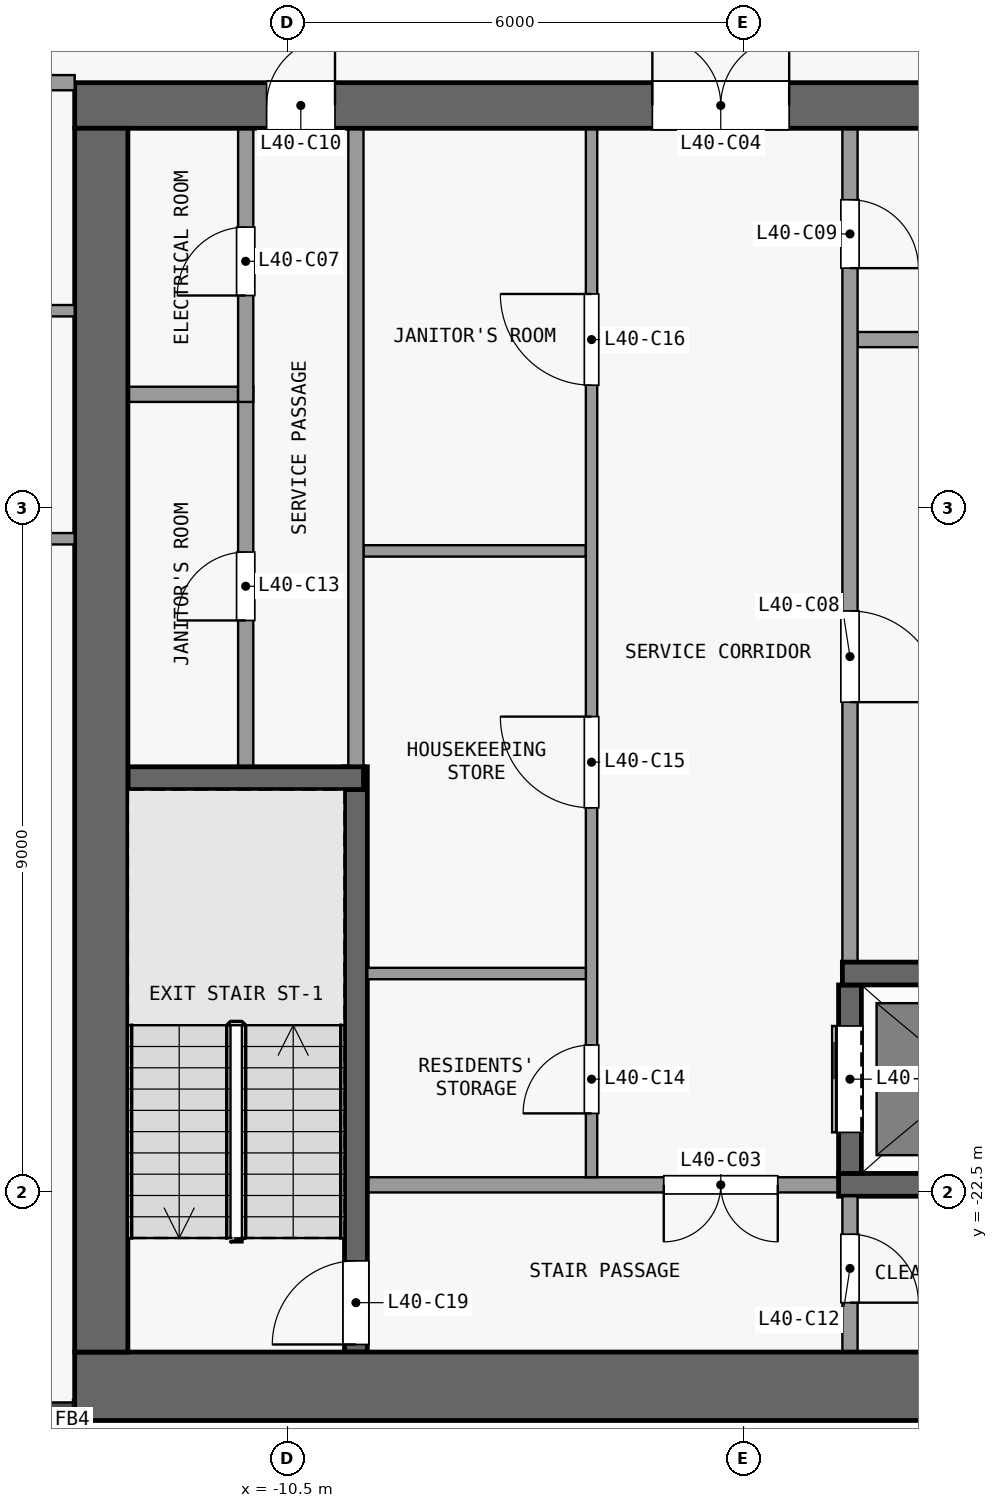
"""IFC4 building model, lengths in metres.
Left out: names, types, materials, properties, quantities, classifications, styles, units other than length and angle.
Written with IfcOpenShell. Run it as: python <this file> out.ifc"""

import sys

from ifc_helpers import new_model, si_unit, direction, frame, frame_2d, origin, place, context, subcontext, project, spatial, rectangle, extrude, element, fill, save


model = new_model("IFC4")
c1 = context("Model", 3, precision=1e-05, world=origin(), true_north=direction((0.0, 1.0)))
c2 = subcontext(c1, "Body", "Model", "MODEL_VIEW")
j1 = project(units=[si_unit("LENGTHUNIT", "METRE"), si_unit("PLANEANGLEUNIT", "RADIAN")], contexts=[c1])
p1 = place(None, origin())
s1 = spatial("IfcSite", under=j1, at=p1, CompositionType="ELEMENT")
p2 = place(p1, origin())
s2 = spatial("IfcBuilding", under=s1, at=p2, CompositionType="ELEMENT")
p3 = place(p2, frame((0.0, 0.0, 163.7)))
s3 = spatial("IfcBuildingStorey", under=s2, at=p3, CompositionType="ELEMENT", Elevation=163.7)
p4 = place(p3, frame((-13.3, -25.05, 0.0), z_axis=(0.0, 0.0, 1.0), x_axis=(1.0, 0.0, 0.0)))
e1 = element("IfcWall", 1, at=p4, inside=s3, PredefinedType="SHEAR", context=c2, shape_type="SweptSolid", body=[
    extrude(rectangle(XDim=26.6, YDim=0.9, at=frame_2d((13.3, 0.0))), origin(), (0.0, 0.0, 1.0), 3.3),
])
p5 = place(p3, frame((-13.3, -8.2, 0.0), z_axis=(0.0, 0.0, 1.0), x_axis=(1.0, 0.0, 0.0)))
e2 = element("IfcWall", 2, at=p5, inside=s3, PredefinedType="SHEAR", context=c2, shape_type="SweptSolid", body=[
    extrude(rectangle(XDim=26.6, YDim=0.6, at=frame_2d((13.3, 0.0))), origin(), (0.0, 0.0, 1.0), 3.3),
])
p6 = place(p5, frame((7.6, 0.0, 0.0)))
e3 = element("IfcOpeningElement", 3, at=p6, cuts=e2, PredefinedType="OPENING", context=c2, shape_type="SweptSolid", body=[
    extrude(rectangle(XDim=1.8, YDim=2.1, at=frame_2d((0.9, 1.05))), frame((0.0, 0.31, 0.0), z_axis=(0.0, -1.0, 0.0), x_axis=(1.0, 0.0, 0.0)), (0.0, 0.0, 1.0), 0.62),
])
p7 = place(p5, frame((17.2, 0.0, 0.0)))
e4 = element("IfcOpeningElement", 4, at=p7, cuts=e2, PredefinedType="OPENING", context=c2, shape_type="SweptSolid", body=[
    extrude(rectangle(XDim=1.8, YDim=2.1, at=frame_2d((0.9, 1.05))), frame((0.0, 0.31, 0.0), z_axis=(0.0, -1.0, 0.0), x_axis=(1.0, 0.0, 0.0)), (0.0, 0.0, 1.0), 0.62),
])
p8 = place(p5, frame((2.525, 0.0, 0.0)))
e5 = element("IfcOpeningElement", 5, at=p8, cuts=e2, PredefinedType="OPENING", context=c2, shape_type="SweptSolid", body=[
    extrude(rectangle(XDim=0.9, YDim=2.1, at=frame_2d((0.45, 1.05))), frame((0.0, 0.31, 0.0), z_axis=(0.0, -1.0, 0.0), x_axis=(1.0, 0.0, 0.0)), (0.0, 0.0, 1.0), 0.62),
])
p9 = place(p5, frame((23.875, 0.0, 0.0)))
e6 = element("IfcOpeningElement", 6, at=p9, cuts=e2, PredefinedType="OPENING", context=c2, shape_type="SweptSolid", body=[
    extrude(rectangle(XDim=1.2, YDim=2.1, at=frame_2d((0.6, 1.05))), frame((0.0, 0.31, 0.0), z_axis=(0.0, -1.0, 0.0), x_axis=(1.0, 0.0, 0.0)), (0.0, 0.0, 1.0), 0.62),
])
p10 = place(p3, frame((-12.95, -24.6, 0.0), z_axis=(0.0, 0.0, 1.0), x_axis=(0.0, 1.0, 0.0)))
e7 = element("IfcWall", 7, at=p10, inside=s3, PredefinedType="SHEAR", context=c2, shape_type="SweptSolid", body=[
    extrude(rectangle(XDim=16.1, YDim=0.7, at=frame_2d((8.05, 0.0))), origin(), (0.0, 0.0, 1.0), 3.3),
])
p11 = place(p3, frame((-3.25, -22.4, 0.0), z_axis=(0.0, 0.0, 1.0), x_axis=(-1.0, 0.0, 0.0)))
e8 = element("IfcWall", 8, at=p11, inside=s3, PredefinedType="PARTITIONING", context=c2, shape_type="SweptSolid", body=[
    extrude(rectangle(XDim=6.2, YDim=0.2, at=frame_2d((3.1, 0.0))), origin(), (0.0, 0.0, 1.0), 3.3),
])
p12 = place(p11, frame((0.8, 0.0, 0.0)))
e9 = element("IfcOpeningElement", 9, at=p12, cuts=e8, PredefinedType="OPENING", context=c2, shape_type="SweptSolid", body=[
    extrude(rectangle(XDim=1.5, YDim=2.1, at=frame_2d((0.75, 1.05))), frame((0.0, 0.11, 0.0), z_axis=(0.0, -1.0, 0.0), x_axis=(1.0, 0.0, 0.0)), (0.0, 0.0, 1.0), 0.22),
])
p13 = place(p3, frame((-3.25, -22.4, 0.0), z_axis=(0.0, 0.0, 1.0), x_axis=(1.0, 0.0, 0.0)))
e10 = element("IfcWall", 10, at=p13, inside=s3, PredefinedType="SHEAR", context=c2, shape_type="SweptSolid", body=[
    extrude(rectangle(XDim=6.2, YDim=0.3, at=frame_2d((3.1, 0.0))), origin(), (0.0, 0.0, 1.0), 3.3),
])
p14 = place(p3, frame((-9.45, -19.62, 0.0), z_axis=(0.0, 0.0, 1.0), x_axis=(1.0, 0.0, 0.0)))
e11 = element("IfcWall", 11, at=p14, inside=s3, PredefinedType="PARTITIONING", context=c2, shape_type="SweptSolid", body=[
    extrude(rectangle(XDim=2.875, YDim=0.15, at=frame_2d((1.438, 0.0))), origin(), (0.0, 0.0, 1.0), 3.3),
])
p15 = place(p3, frame((-3.2, -19.62, 0.0), z_axis=(0.0, 0.0, 1.0), x_axis=(1.0, 0.0, 0.0)))
e12 = element("IfcWall", 12, at=p15, inside=s3, PredefinedType="SHEAR", context=c2, shape_type="SweptSolid", body=[
    extrude(rectangle(XDim=3.05, YDim=0.3, at=frame_2d((1.525, 0.0))), origin(), (0.0, 0.0, 1.0), 3.3),
])
p16 = place(p3, frame((-12.6, -17.05, 0.0), z_axis=(0.0, 0.0, 1.0), x_axis=(1.0, 0.0, 0.0)))
e13 = element("IfcWall", 13, at=p16, inside=s3, PredefinedType="SHEAR", context=c2, shape_type="SweptSolid", body=[
    extrude(rectangle(XDim=3.1, YDim=0.3, at=frame_2d((1.55, 0.0))), origin(), (0.0, 0.0, 1.0), 3.3),
])
p17 = place(p3, frame((-9.5, -14.06, 0.0), z_axis=(0.0, 0.0, 1.0), x_axis=(1.0, 0.0, 0.0)))
e14 = element("IfcWall", 14, at=p17, inside=s3, PredefinedType="PARTITIONING", context=c2, shape_type="SweptSolid", body=[
    extrude(rectangle(XDim=2.925, YDim=0.15, at=frame_2d((1.462, 0.0))), origin(), (0.0, 0.0, 1.0), 3.3),
])
p18 = place(p3, frame((-12.6, -12.0, 0.0), z_axis=(0.0, 0.0, 1.0), x_axis=(1.0, 0.0, 0.0)))
e15 = element("IfcWall", 15, at=p18, inside=s3, PredefinedType="PARTITIONING", context=c2, shape_type="SweptSolid", body=[
    extrude(rectangle(XDim=1.45, YDim=0.2, at=frame_2d((0.725, 0.0))), origin(), (0.0, 0.0, 1.0), 3.3),
])
p19 = place(p3, frame((-3.0, -11.28, 0.0), z_axis=(0.0, 0.0, 1.0), x_axis=(1.0, 0.0, 0.0)))
e16 = element("IfcWall", 16, at=p19, inside=s3, PredefinedType="PARTITIONING", context=c2, shape_type="SweptSolid", body=[
    extrude(rectangle(XDim=2.85, YDim=0.2, at=frame_2d((1.425, 0.0))), origin(), (0.0, 0.0, 1.0), 3.3),
])
p20 = place(p3, frame((-11.05, -16.9, 0.0), z_axis=(0.0, 0.0, 1.0), x_axis=(0.0, 1.0, 0.0)))
e17 = element("IfcWall", 17, at=p20, inside=s3, PredefinedType="PARTITIONING", context=c2, shape_type="SweptSolid", body=[
    extrude(rectangle(XDim=5.0, YDim=0.2, at=frame_2d((2.5, 0.0))), origin(), (0.0, 0.0, 1.0), 3.3),
])
p21 = place(p20, frame((1.925, 0.0, 0.0)))
e18 = element("IfcOpeningElement", 18, at=p21, cuts=e17, PredefinedType="OPENING", context=c2, shape_type="SweptSolid", body=[
    extrude(rectangle(XDim=0.9, YDim=2.1, at=frame_2d((0.45, 1.05))), frame((0.0, 0.11, 0.0), z_axis=(0.0, -1.0, 0.0), x_axis=(1.0, 0.0, 0.0)), (0.0, 0.0, 1.0), 0.22),
])
p22 = place(p3, frame((-11.05, -12.1, 0.0), z_axis=(0.0, 0.0, 1.0), x_axis=(0.0, 1.0, 0.0)))
e19 = element("IfcWall", 19, at=p22, inside=s3, PredefinedType="PARTITIONING", context=c2, shape_type="SweptSolid", body=[
    extrude(rectangle(XDim=3.6, YDim=0.2, at=frame_2d((1.8, 0.0))), origin(), (0.0, 0.0, 1.0), 3.3),
])
p23 = place(p22, frame((1.4, 0.0, 0.0)))
e20 = element("IfcOpeningElement", 20, at=p23, cuts=e19, PredefinedType="OPENING", context=c2, shape_type="SweptSolid", body=[
    extrude(rectangle(XDim=0.9, YDim=2.1, at=frame_2d((0.45, 1.05))), frame((0.0, 0.11, 0.0), z_axis=(0.0, -1.0, 0.0), x_axis=(1.0, 0.0, 0.0)), (0.0, 0.0, 1.0), 0.22),
])
p24 = place(p3, frame((-9.6, -24.6, 0.0), z_axis=(0.0, 0.0, 1.0), x_axis=(0.0, 1.0, 0.0)))
e21 = element("IfcWall", 21, at=p24, inside=s3, PredefinedType="SHEAR", context=c2, shape_type="SweptSolid", body=[
    extrude(rectangle(XDim=7.7, YDim=0.3, at=frame_2d((3.85, 0.0))), origin(), (0.0, 0.0, 1.0), 3.3),
])
p25 = place(p24, frame((0.1, 0.0, 0.0)))
e22 = element("IfcOpeningElement", 22, at=p25, cuts=e21, PredefinedType="OPENING", context=c2, shape_type="SweptSolid", body=[
    extrude(rectangle(XDim=1.1, YDim=2.1, at=frame_2d((0.55, 1.05))), frame((0.0, 0.16, 0.0), z_axis=(0.0, -1.0, 0.0), x_axis=(1.0, 0.0, 0.0)), (0.0, 0.0, 1.0), 0.32),
])
p26 = place(p3, frame((-9.6, -16.9, 0.0), z_axis=(0.0, 0.0, 1.0), x_axis=(0.0, 1.0, 0.0)))
e23 = element("IfcWall", 23, at=p26, inside=s3, PredefinedType="PARTITIONING", context=c2, shape_type="SweptSolid", body=[
    extrude(rectangle(XDim=8.4, YDim=0.2, at=frame_2d((4.2, 0.0))), origin(), (0.0, 0.0, 1.0), 3.3),
])
p27 = place(p3, frame((-6.5, -22.3, 0.0), z_axis=(0.0, 0.0, 1.0), x_axis=(0.0, 1.0, 0.0)))
e24 = element("IfcWall", 24, at=p27, inside=s3, PredefinedType="PARTITIONING", context=c2, shape_type="SweptSolid", body=[
    extrude(rectangle(XDim=13.8, YDim=0.15, at=frame_2d((6.9, 0.0))), origin(), (0.0, 0.0, 1.0), 3.3),
])
p28 = place(p27, frame((0.84, 0.0, 0.0)))
e25 = element("IfcOpeningElement", 25, at=p28, cuts=e24, PredefinedType="OPENING", context=c2, shape_type="SweptSolid", body=[
    extrude(rectangle(XDim=0.9, YDim=2.1, at=frame_2d((0.45, 1.05))), frame((0.0, 0.085, 0.0), z_axis=(0.0, -1.0, 0.0), x_axis=(1.0, 0.0, 0.0)), (0.0, 0.0, 1.0), 0.17),
])
p29 = place(p27, frame((4.86, 0.0, 0.0)))
e26 = element("IfcOpeningElement", 26, at=p29, cuts=e24, PredefinedType="OPENING", context=c2, shape_type="SweptSolid", body=[
    extrude(rectangle(XDim=1.2, YDim=2.1, at=frame_2d((0.6, 1.05))), frame((0.0, 0.085, 0.0), z_axis=(0.0, -1.0, 0.0), x_axis=(1.0, 0.0, 0.0)), (0.0, 0.0, 1.0), 0.17),
])
p30 = place(p27, frame((10.42, 0.0, 0.0)))
e27 = element("IfcOpeningElement", 27, at=p30, cuts=e24, PredefinedType="OPENING", context=c2, shape_type="SweptSolid", body=[
    extrude(rectangle(XDim=1.2, YDim=2.1, at=frame_2d((0.6, 1.05))), frame((0.0, 0.085, 0.0), z_axis=(0.0, -1.0, 0.0), x_axis=(1.0, 0.0, 0.0)), (0.0, 0.0, 1.0), 0.17),
])
p31 = place(p3, frame((-3.1, -22.55, 0.0), z_axis=(0.0, 0.0, 1.0), x_axis=(0.0, -1.0, 0.0)))
e28 = element("IfcWall", 28, at=p31, inside=s3, PredefinedType="PARTITIONING", context=c2, shape_type="SweptSolid", body=[
    extrude(rectangle(XDim=2.05, YDim=0.2, at=frame_2d((1.025, 0.0))), origin(), (0.0, 0.0, 1.0), 3.3),
])
p32 = place(p31, frame((0.5, 0.0, 0.0)))
e29 = element("IfcOpeningElement", 29, at=p32, cuts=e28, PredefinedType="OPENING", context=c2, shape_type="SweptSolid", body=[
    extrude(rectangle(XDim=0.9, YDim=2.1, at=frame_2d((0.45, 1.05))), frame((0.0, 0.11, 0.0), z_axis=(0.0, -1.0, 0.0), x_axis=(1.0, 0.0, 0.0)), (0.0, 0.0, 1.0), 0.22),
])
p33 = place(p3, frame((-3.1, -22.25, 0.0), z_axis=(0.0, 0.0, 1.0), x_axis=(0.0, 1.0, 0.0)))
e30 = element("IfcWall", 30, at=p33, inside=s3, PredefinedType="SHEAR", context=c2, shape_type="SweptSolid", body=[
    extrude(rectangle(XDim=2.48, YDim=0.3, at=frame_2d((1.24, 0.0))), origin(), (0.0, 0.0, 1.0), 3.3),
])
p34 = place(p33, frame((0.54, 0.0, 0.0)))
e31 = element("IfcOpeningElement", 31, at=p34, cuts=e30, PredefinedType="OPENING", context=c2, shape_type="SweptSolid", body=[
    extrude(rectangle(XDim=1.4, YDim=2.1, at=frame_2d((0.7, 1.05))), frame((0.0, 0.16, 0.0), z_axis=(0.0, -1.0, 0.0), x_axis=(1.0, 0.0, 0.0)), (0.0, 0.0, 1.0), 0.32),
])
p35 = place(p3, frame((-3.1, -8.5, 0.0), z_axis=(0.0, 0.0, 1.0), x_axis=(0.0, -1.0, 0.0)))
e32 = element("IfcWall", 32, at=p35, inside=s3, PredefinedType="PARTITIONING", context=c2, shape_type="SweptSolid", body=[
    extrude(rectangle(XDim=10.97, YDim=0.2, at=frame_2d((5.485, 0.0))), origin(), (0.0, 0.0, 1.0), 3.3),
])
p36 = place(p35, frame((6.35, 0.0, 0.0)))
e33 = element("IfcOpeningElement", 33, at=p36, cuts=e32, PredefinedType="OPENING", context=c2, shape_type="SweptSolid", body=[
    extrude(rectangle(XDim=1.2, YDim=2.1, at=frame_2d((0.6, 1.05))), frame((0.0, 0.11, 0.0), z_axis=(0.0, -1.0, 0.0), x_axis=(1.0, 0.0, 0.0)), (0.0, 0.0, 1.0), 0.22),
])
p37 = place(p35, frame((0.94, 0.0, 0.0)))
e34 = element("IfcOpeningElement", 34, at=p37, cuts=e32, PredefinedType="OPENING", context=c2, shape_type="SweptSolid", body=[
    extrude(rectangle(XDim=0.9, YDim=2.1, at=frame_2d((0.45, 1.05))), frame((0.0, 0.11, 0.0), z_axis=(0.0, -1.0, 0.0), x_axis=(1.0, 0.0, 0.0)), (0.0, 0.0, 1.0), 0.22),
])
p38 = place(p3, frame((-19.262, -13.9, 0.0), z_axis=(0.0, 0.0, 1.0), x_axis=(1.0, 0.0, 0.0)))
e35 = element("IfcWall", 35, at=p38, inside=s3, PredefinedType="PARTITIONING", context=c2, shape_type="SweptSolid", body=[
    extrude(rectangle(XDim=5.962, YDim=0.15, at=frame_2d((2.981, 0.0))), origin(), (0.0, 0.0, 1.0), 3.3),
])
p39 = place(p38, frame((0.512, 0.0, 0.0)))
e36 = element("IfcOpeningElement", 36, at=p39, cuts=e35, PredefinedType="OPENING", context=c2, shape_type="SweptSolid", body=[
    extrude(rectangle(XDim=0.9, YDim=2.1, at=frame_2d((0.45, 1.05))), frame((0.0, 0.085, 0.0), z_axis=(0.0, -1.0, 0.0), x_axis=(1.0, 0.0, 0.0)), (0.0, 0.0, 1.0), 0.17),
])
p40 = place(p3, frame((-20.163, -10.9, 0.0), z_axis=(0.0, 0.0, 1.0), x_axis=(1.0, 0.0, 0.0)))
e37 = element("IfcWall", 37, at=p40, inside=s3, PredefinedType="PARTITIONING", context=c2, shape_type="SweptSolid", body=[
    extrude(rectangle(XDim=6.863, YDim=0.15, at=frame_2d((3.431, 0.0))), origin(), (0.0, 0.0, 1.0), 3.3),
])
p41 = place(p40, frame((1.413, 0.0, 0.0)))
e38 = element("IfcOpeningElement", 38, at=p41, cuts=e37, PredefinedType="OPENING", context=c2, shape_type="SweptSolid", body=[
    extrude(rectangle(XDim=0.9, YDim=2.1, at=frame_2d((0.45, 1.05))), frame((0.0, 0.085, 0.0), z_axis=(0.0, -1.0, 0.0), x_axis=(1.0, 0.0, 0.0)), (0.0, 0.0, 1.0), 0.17),
])
p42 = place(p40, frame((4.863, 0.0, 0.0)))
e39 = element("IfcOpeningElement", 39, at=p42, cuts=e37, PredefinedType="OPENING", context=c2, shape_type="SweptSolid", body=[
    extrude(rectangle(XDim=0.9, YDim=2.1, at=frame_2d((0.45, 1.05))), frame((0.0, 0.085, 0.0), z_axis=(0.0, -1.0, 0.0), x_axis=(1.0, 0.0, 0.0)), (0.0, 0.0, 1.0), 0.17),
])
p43 = place(p3, frame((-20.163, -7.9, 0.0), z_axis=(0.0, 0.0, 1.0), x_axis=(1.0, 0.0, 0.0)))
e40 = element("IfcWall", 40, at=p43, inside=s3, PredefinedType="PARTITIONING", context=c2, shape_type="SweptSolid", body=[
    extrude(rectangle(XDim=6.863, YDim=0.2, at=frame_2d((3.431, 0.0))), origin(), (0.0, 0.0, 1.0), 3.3),
])
p44 = place(p43, frame((2.913, 0.0, 0.0)))
e41 = element("IfcOpeningElement", 41, at=p44, cuts=e40, PredefinedType="OPENING", context=c2, shape_type="SweptSolid", body=[
    extrude(rectangle(XDim=1.0, YDim=2.1, at=frame_2d((0.5, 1.05))), frame((0.0, 0.11, 0.0), z_axis=(0.0, -1.0, 0.0), x_axis=(1.0, 0.0, 0.0)), (0.0, 0.0, 1.0), 0.22),
])
p45 = place(p34, origin())
e42 = element("IfcDoor", 42, at=p45, inside=s3, OperationType="DOUBLE_DOOR_SLIDING", PredefinedType="DOOR", context=c2, shape_type="SweptSolid", body=[
    extrude(rectangle(XDim=1.4, YDim=2.1, at=frame_2d((0.7, 1.05))), frame((0.0, 0.025, 0.0), z_axis=(0.0, -1.0, 0.0), x_axis=(1.0, 0.0, 0.0)), (0.0, 0.0, 1.0), 0.05),
])
fill(e31, e42)
p46 = place(p12, origin())
e43 = element("IfcDoor", 43, at=p46, inside=s3, OperationType="DOUBLE_DOOR_SINGLE_SWING", PredefinedType="DOOR", context=c2, shape_type="SweptSolid", body=[
    extrude(rectangle(XDim=1.5, YDim=2.1, at=frame_2d((0.75, 1.05))), frame((0.0, 0.025, 0.0), z_axis=(0.0, -1.0, 0.0), x_axis=(1.0, 0.0, 0.0)), (0.0, 0.0, 1.0), 0.05),
])
fill(e9, e43)
p47 = place(p6, origin())
e44 = element("IfcDoor", 44, at=p47, inside=s3, OperationType="DOUBLE_DOOR_SINGLE_SWING", PredefinedType="DOOR", context=c2, shape_type="SweptSolid", body=[
    extrude(rectangle(XDim=1.8, YDim=2.1, at=frame_2d((0.9, 1.05))), frame((0.0, 0.025, 0.0), z_axis=(0.0, -1.0, 0.0), x_axis=(1.0, 0.0, 0.0)), (0.0, 0.0, 1.0), 0.05),
])
fill(e3, e44)
p48 = place(p23, origin())
e45 = element("IfcDoor", 45, at=p48, inside=s3, OperationType="SINGLE_SWING_LEFT", PredefinedType="DOOR", context=c2, shape_type="SweptSolid", body=[
    extrude(rectangle(XDim=0.9, YDim=2.1, at=frame_2d((0.45, 1.05))), frame((0.0, 0.025, 0.0), z_axis=(0.0, -1.0, 0.0), x_axis=(1.0, 0.0, 0.0)), (0.0, 0.0, 1.0), 0.05),
])
fill(e20, e45)
p49 = place(p36, origin())
e46 = element("IfcDoor", 46, at=p49, inside=s3, OperationType="SINGLE_SWING_RIGHT", PredefinedType="DOOR", context=c2, shape_type="SweptSolid", body=[
    extrude(rectangle(XDim=1.2, YDim=2.1, at=frame_2d((0.6, 1.05))), frame((0.0, 0.025, 0.0), z_axis=(0.0, -1.0, 0.0), x_axis=(1.0, 0.0, 0.0)), (0.0, 0.0, 1.0), 0.05),
])
fill(e33, e46)
p50 = place(p37, origin())
e47 = element("IfcDoor", 47, at=p50, inside=s3, OperationType="SINGLE_SWING_RIGHT", PredefinedType="DOOR", context=c2, shape_type="SweptSolid", body=[
    extrude(rectangle(XDim=0.9, YDim=2.1, at=frame_2d((0.45, 1.05))), frame((0.0, 0.025, 0.0), z_axis=(0.0, -1.0, 0.0), x_axis=(1.0, 0.0, 0.0)), (0.0, 0.0, 1.0), 0.05),
])
fill(e34, e47)
p51 = place(p8, origin())
e48 = element("IfcDoor", 48, at=p51, inside=s3, OperationType="SINGLE_SWING_RIGHT", PredefinedType="DOOR", context=c2, shape_type="SweptSolid", body=[
    extrude(rectangle(XDim=0.9, YDim=2.1, at=frame_2d((0.45, 1.05))), frame((0.0, 0.025, 0.0), z_axis=(0.0, -1.0, 0.0), x_axis=(1.0, 0.0, 0.0)), (0.0, 0.0, 1.0), 0.05),
])
fill(e5, e48)
p52 = place(p32, origin())
e49 = element("IfcDoor", 49, at=p52, inside=s3, OperationType="SINGLE_SWING_RIGHT", PredefinedType="DOOR", context=c2, shape_type="SweptSolid", body=[
    extrude(rectangle(XDim=0.9, YDim=2.1, at=frame_2d((0.45, 1.05))), frame((0.0, 0.025, 0.0), z_axis=(0.0, -1.0, 0.0), x_axis=(1.0, 0.0, 0.0)), (0.0, 0.0, 1.0), 0.05),
])
fill(e29, e49)
p53 = place(p21, origin())
e50 = element("IfcDoor", 50, at=p53, inside=s3, OperationType="SINGLE_SWING_LEFT", PredefinedType="DOOR", context=c2, shape_type="SweptSolid", body=[
    extrude(rectangle(XDim=0.9, YDim=2.1, at=frame_2d((0.45, 1.05))), frame((0.0, 0.025, 0.0), z_axis=(0.0, -1.0, 0.0), x_axis=(1.0, 0.0, 0.0)), (0.0, 0.0, 1.0), 0.05),
])
fill(e18, e50)
p54 = place(p28, origin())
e51 = element("IfcDoor", 51, at=p54, inside=s3, OperationType="SINGLE_SWING_LEFT", PredefinedType="DOOR", context=c2, shape_type="SweptSolid", body=[
    extrude(rectangle(XDim=0.9, YDim=2.1, at=frame_2d((0.45, 1.05))), frame((0.0, 0.025, 0.0), z_axis=(0.0, -1.0, 0.0), x_axis=(1.0, 0.0, 0.0)), (0.0, 0.0, 1.0), 0.05),
])
fill(e25, e51)
p55 = place(p29, origin())
e52 = element("IfcDoor", 52, at=p55, inside=s3, OperationType="SINGLE_SWING_RIGHT", PredefinedType="DOOR", context=c2, shape_type="SweptSolid", body=[
    extrude(rectangle(XDim=1.2, YDim=2.1, at=frame_2d((0.6, 1.05))), frame((0.0, 0.025, 0.0), z_axis=(0.0, -1.0, 0.0), x_axis=(1.0, 0.0, 0.0)), (0.0, 0.0, 1.0), 0.05),
])
fill(e26, e52)
p56 = place(p30, origin())
e53 = element("IfcDoor", 53, at=p56, inside=s3, OperationType="SINGLE_SWING_RIGHT", PredefinedType="DOOR", context=c2, shape_type="SweptSolid", body=[
    extrude(rectangle(XDim=1.2, YDim=2.1, at=frame_2d((0.6, 1.05))), frame((0.0, 0.025, 0.0), z_axis=(0.0, -1.0, 0.0), x_axis=(1.0, 0.0, 0.0)), (0.0, 0.0, 1.0), 0.05),
])
fill(e27, e53)
p57 = place(p25, origin())
e54 = element("IfcDoor", 54, at=p57, inside=s3, OperationType="SINGLE_SWING_LEFT", PredefinedType="DOOR", context=c2, shape_type="SweptSolid", body=[
    extrude(rectangle(XDim=1.1, YDim=2.1, at=frame_2d((0.55, 1.05))), frame((0.0, 0.025, 0.0), z_axis=(0.0, -1.0, 0.0), x_axis=(1.0, 0.0, 0.0)), (0.0, 0.0, 1.0), 0.05),
])
fill(e22, e54)
save(model, sys.argv[1])
